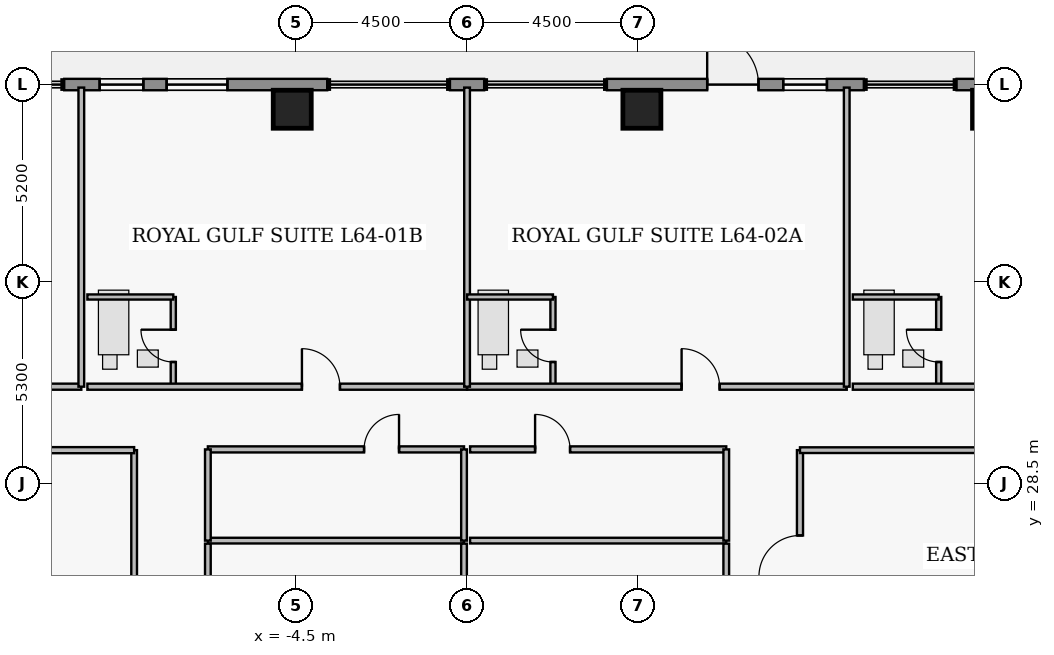
"""IFC4 building model, lengths in metres.
Left out: names, types, materials, properties, quantities, classifications, styles, units other than length and angle.
Written with IfcOpenShell. Run it as: python <this file> out.ifc"""

import sys

from ifc_helpers import new_model, si_unit, direction, frame, frame_2d, origin, origin_2d, place, context, subcontext, project, spatial, rectangle, extrude, element, fill, save


model = new_model("IFC4")
c1 = context("Model", 3, precision=1e-05, world=origin(), true_north=direction((0.0, 1.0)))
c2 = subcontext(c1, "Body", "Model", "MODEL_VIEW")
j1 = project(units=[si_unit("LENGTHUNIT", "METRE"), si_unit("PLANEANGLEUNIT", "RADIAN")], contexts=[c1])
p1 = place(None, origin())
s1 = spatial("IfcSite", under=j1, at=p1, CompositionType="ELEMENT")
p2 = place(p1, origin())
s2 = spatial("IfcBuilding", under=s1, at=p2, CompositionType="ELEMENT")
p3 = place(p2, frame((0.0, 0.0, 254.45)))
s3 = spatial("IfcBuildingStorey", under=s2, at=p3, CompositionType="ELEMENT", Elevation=254.45)
for number, where, z_axis, x_axis in (
    (1, (-4.6, 38.35, 0.0), (0.0, 0.0, 1.0), (1.0, 0.0, 0.0)),
    (2, (4.6, 38.35, 0.0), (0.0, 0.0, 1.0), (1.0, 0.0, 0.0)),
    (3, (13.8, 38.35, 0.0), (0.0, 0.0, 1.0), (1.0, 0.0, 0.0)),
):
    element("IfcColumn", number, at=place(p3, frame(where, z_axis=z_axis, x_axis=x_axis)), inside=s3, PredefinedType="COLUMN", context=c2, shape_type="SweptSolid", body=[
        extrude(rectangle(XDim=1.0, YDim=1.0, at=origin_2d()), origin(), (0.0, 0.0, 1.0), 3.7),
    ])
p4 = place(p3, frame((-10.6, 39.0, 0.0), z_axis=(0.0, 0.0, 1.0), x_axis=(1.0, 0.0, 0.0)))
e4 = element("IfcWall", 4, at=p4, inside=s3, PredefinedType="STANDARD", context=c2, shape_type="SweptSolid", body=[
    extrude(rectangle(XDim=6.92, YDim=0.3, at=frame_2d((3.46, 0.0))), origin(), (0.0, 0.0, 1.0), 3.48),
])
p5 = place(p4, frame((2.695, 0.0, 0.85)))
e5 = element("IfcOpeningElement", 5, at=p5, cuts=e4, PredefinedType="OPENING", context=c2, shape_type="SweptSolid", body=[
    extrude(rectangle(XDim=1.6, YDim=1.8, at=frame_2d((0.8, 0.9))), frame((0.0, 0.16, 0.0), z_axis=(0.0, -1.0, 0.0), x_axis=(1.0, 0.0, 0.0)), (0.0, 0.0, 1.0), 0.32),
])
p6 = place(p4, frame((0.933, 0.0, 0.95)))
e6 = element("IfcOpeningElement", 6, at=p6, cuts=e4, PredefinedType="OPENING", context=c2, shape_type="SweptSolid", body=[
    extrude(rectangle(XDim=1.15, YDim=1.55, at=frame_2d((0.575, 0.775))), frame((0.0, 0.16, 0.0), z_axis=(0.0, -1.0, 0.0), x_axis=(1.0, 0.0, 0.0)), (0.0, 0.0, 1.0), 0.32),
])
p7 = place(p3, frame((-0.45, 39.0, 0.0), z_axis=(0.0, 0.0, 1.0), x_axis=(1.0, 0.0, 0.0)))
e7 = element("IfcWall", 7, at=p7, inside=s3, PredefinedType="STANDARD", context=c2, shape_type="SweptSolid", body=[
    extrude(rectangle(XDim=0.9, YDim=0.3, at=frame_2d((0.45, 0.0))), origin(), (0.0, 0.0, 1.0), 3.48),
])
p8 = place(p3, frame((3.68, 39.0, 0.0), z_axis=(0.0, 0.0, 1.0), x_axis=(1.0, 0.0, 0.0)))
e8 = element("IfcWall", 8, at=p8, inside=s3, PredefinedType="STANDARD", context=c2, shape_type="SweptSolid", body=[
    extrude(rectangle(XDim=6.76, YDim=0.3, at=frame_2d((3.38, 0.0))), origin(), (0.0, 0.0, 1.0), 3.48),
])
p9 = place(p8, frame((2.638, 0.0, 0.0)))
e9 = element("IfcOpeningElement", 9, at=p9, cuts=e8, PredefinedType="OPENING", context=c2, shape_type="SweptSolid", body=[
    extrude(rectangle(XDim=1.35, YDim=2.3, at=frame_2d((0.675, 1.15))), frame((0.0, 0.16, 0.0), z_axis=(0.0, -1.0, 0.0), x_axis=(1.0, 0.0, 0.0)), (0.0, 0.0, 1.0), 0.32),
])
p10 = place(p8, frame((4.639, 0.0, 0.95)))
e10 = element("IfcOpeningElement", 10, at=p10, cuts=e8, PredefinedType="OPENING", context=c2, shape_type="SweptSolid", body=[
    extrude(rectangle(XDim=1.15, YDim=1.55, at=frame_2d((0.575, 0.775))), frame((0.0, 0.16, 0.0), z_axis=(0.0, -1.0, 0.0), x_axis=(1.0, 0.0, 0.0)), (0.0, 0.0, 1.0), 0.32),
])
p11 = place(p3, frame((12.88, 39.0, 0.0), z_axis=(0.0, 0.0, 1.0), x_axis=(1.0, 0.0, 0.0)))
e11 = element("IfcWall", 11, at=p11, inside=s3, PredefinedType="STANDARD", context=c2, shape_type="SweptSolid", body=[
    extrude(rectangle(XDim=3.92, YDim=0.3, at=frame_2d((1.96, 0.0))), origin(), (0.0, 0.0, 1.0), 3.48),
])
p12 = place(p11, frame((2.075, 0.0, 0.95)))
e12 = element("IfcOpeningElement", 12, at=p12, cuts=e11, PredefinedType="OPENING", context=c2, shape_type="SweptSolid", body=[
    extrude(rectangle(XDim=1.15, YDim=1.55, at=frame_2d((0.575, 0.775))), frame((0.0, 0.16, 0.0), z_axis=(0.0, -1.0, 0.0), x_axis=(1.0, 0.0, 0.0)), (0.0, 0.0, 1.0), 0.32),
])
p13 = place(p3, frame((-20.14, 31.05, 0.0), z_axis=(0.0, 0.0, 1.0), x_axis=(1.0, 0.0, 0.0)))
e13 = element("IfcWall", 13, at=p13, inside=s3, PredefinedType="PARTITIONING", context=c2, shape_type="SweptSolid", body=[
    extrude(rectangle(XDim=9.99, YDim=0.16, at=frame_2d((4.995, 0.0))), origin(), (0.0, 0.0, 1.0), 3.48),
])
p14 = place(p13, frame((5.645, 0.0, 0.0)))
e14 = element("IfcOpeningElement", 14, at=p14, cuts=e13, PredefinedType="OPENING", context=c2, shape_type="SweptSolid", body=[
    extrude(rectangle(XDim=1.0, YDim=2.15, at=frame_2d((0.5, 1.075))), frame((0.0, 0.09, 0.0), z_axis=(0.0, -1.0, 0.0), x_axis=(1.0, 0.0, 0.0)), (0.0, 0.0, 1.0), 0.18),
])
p15 = place(p3, frame((-7.73, 31.05, 0.0), z_axis=(0.0, 0.0, 1.0), x_axis=(0.0, 1.0, 0.0)))
e15 = element("IfcWall", 15, at=p15, inside=s3, PredefinedType="PLUMBINGWALL", context=c2, shape_type="SweptSolid", body=[
    extrude(rectangle(XDim=2.36, YDim=0.135, at=frame_2d((1.18, 0.0))), origin(), (0.0, 0.0, 1.0), 3.48),
])
p16 = place(p15, frame((0.65, 0.0, 0.0)))
e16 = element("IfcOpeningElement", 16, at=p16, cuts=e15, PredefinedType="OPENING", context=c2, shape_type="SweptSolid", body=[
    extrude(rectangle(XDim=0.85, YDim=2.1, at=frame_2d((0.425, 1.05))), frame((0.0, 0.077, 0.0), z_axis=(0.0, -1.0, 0.0), x_axis=(1.0, 0.0, 0.0)), (0.0, 0.0, 1.0), 0.155),
])
p17 = place(p3, frame((-9.99, 31.05, 0.0), z_axis=(0.0, 0.0, 1.0), x_axis=(1.0, 0.0, 0.0)))
e17 = element("IfcWall", 17, at=p17, inside=s3, PredefinedType="PARTITIONING", context=c2, shape_type="SweptSolid", body=[
    extrude(rectangle(XDim=9.99, YDim=0.16, at=frame_2d((4.995, 0.0))), origin(), (0.0, 0.0, 1.0), 3.48),
])
p18 = place(p17, frame((5.645, 0.0, 0.0)))
e18 = element("IfcOpeningElement", 18, at=p18, cuts=e17, PredefinedType="OPENING", context=c2, shape_type="SweptSolid", body=[
    extrude(rectangle(XDim=1.0, YDim=2.15, at=frame_2d((0.5, 1.075))), frame((0.0, 0.09, 0.0), z_axis=(0.0, -1.0, 0.0), x_axis=(1.0, 0.0, 0.0)), (0.0, 0.0, 1.0), 0.18),
])
p19 = place(p3, frame((2.26, 31.05, 0.0), z_axis=(0.0, 0.0, 1.0), x_axis=(0.0, 1.0, 0.0)))
e19 = element("IfcWall", 19, at=p19, inside=s3, PredefinedType="PLUMBINGWALL", context=c2, shape_type="SweptSolid", body=[
    extrude(rectangle(XDim=2.36, YDim=0.135, at=frame_2d((1.18, 0.0))), origin(), (0.0, 0.0, 1.0), 3.48),
])
p20 = place(p19, frame((0.65, 0.0, 0.0)))
e20 = element("IfcOpeningElement", 20, at=p20, cuts=e19, PredefinedType="OPENING", context=c2, shape_type="SweptSolid", body=[
    extrude(rectangle(XDim=0.85, YDim=2.1, at=frame_2d((0.425, 1.05))), frame((0.0, 0.077, 0.0), z_axis=(0.0, -1.0, 0.0), x_axis=(1.0, 0.0, 0.0)), (0.0, 0.0, 1.0), 0.155),
])
p21 = place(p3, frame((0.0, 31.05, 0.0), z_axis=(0.0, 0.0, 1.0), x_axis=(1.0, 0.0, 0.0)))
e21 = element("IfcWall", 21, at=p21, inside=s3, PredefinedType="PARTITIONING", context=c2, shape_type="SweptSolid", body=[
    extrude(rectangle(XDim=9.99, YDim=0.16, at=frame_2d((4.995, 0.0))), origin(), (0.0, 0.0, 1.0), 3.48),
])
p22 = place(p21, frame((5.645, 0.0, 0.0)))
e22 = element("IfcOpeningElement", 22, at=p22, cuts=e21, PredefinedType="OPENING", context=c2, shape_type="SweptSolid", body=[
    extrude(rectangle(XDim=1.0, YDim=2.15, at=frame_2d((0.5, 1.075))), frame((0.0, 0.09, 0.0), z_axis=(0.0, -1.0, 0.0), x_axis=(1.0, 0.0, 0.0)), (0.0, 0.0, 1.0), 0.18),
])
p23 = place(p3, frame((12.41, 31.05, 0.0), z_axis=(0.0, 0.0, 1.0), x_axis=(0.0, 1.0, 0.0)))
e23 = element("IfcWall", 23, at=p23, inside=s3, PredefinedType="PLUMBINGWALL", context=c2, shape_type="SweptSolid", body=[
    extrude(rectangle(XDim=2.36, YDim=0.135, at=frame_2d((1.18, 0.0))), origin(), (0.0, 0.0, 1.0), 3.48),
])
p24 = place(p23, frame((0.65, 0.0, 0.0)))
e24 = element("IfcOpeningElement", 24, at=p24, cuts=e23, PredefinedType="OPENING", context=c2, shape_type="SweptSolid", body=[
    extrude(rectangle(XDim=0.85, YDim=2.1, at=frame_2d((0.425, 1.05))), frame((0.0, 0.077, 0.0), z_axis=(0.0, -1.0, 0.0), x_axis=(1.0, 0.0, 0.0)), (0.0, 0.0, 1.0), 0.155),
])
p25 = place(p3, frame((10.15, 31.05, 0.0), z_axis=(0.0, 0.0, 1.0), x_axis=(1.0, 0.0, 0.0)))
e25 = element("IfcWall", 25, at=p25, inside=s3, PredefinedType="PARTITIONING", context=c2, shape_type="SweptSolid", body=[
    extrude(rectangle(XDim=9.99, YDim=0.16, at=frame_2d((4.995, 0.0))), origin(), (0.0, 0.0, 1.0), 3.48),
])
p26 = place(p25, frame((5.645, 0.0, 0.0)))
e26 = element("IfcOpeningElement", 26, at=p26, cuts=e25, PredefinedType="OPENING", context=c2, shape_type="SweptSolid", body=[
    extrude(rectangle(XDim=1.0, YDim=2.15, at=frame_2d((0.5, 1.075))), frame((0.0, 0.09, 0.0), z_axis=(0.0, -1.0, 0.0), x_axis=(1.0, 0.0, 0.0)), (0.0, 0.0, 1.0), 0.18),
])
p27 = place(p3, frame((-6.82, 29.4, 0.0), z_axis=(0.0, 0.0, 1.0), x_axis=(1.0, 0.0, 0.0)))
e27 = element("IfcWall", 27, at=p27, inside=s3, PredefinedType="PARTITIONING", context=c2, shape_type="SweptSolid", body=[
    extrude(rectangle(XDim=6.74, YDim=0.16, at=frame_2d((3.37, 0.0))), origin(), (0.0, 0.0, 1.0), 3.48),
])
p28 = place(p27, frame((4.11, 0.0, 0.0)))
e28 = element("IfcOpeningElement", 28, at=p28, cuts=e27, PredefinedType="OPENING", context=c2, shape_type="SweptSolid", body=[
    extrude(rectangle(XDim=0.92, YDim=2.12, at=frame_2d((0.46, 1.06))), frame((0.0, 0.09, 0.0), z_axis=(0.0, -1.0, 0.0), x_axis=(1.0, 0.0, 0.0)), (0.0, 0.0, 1.0), 0.18),
])
p29 = place(p3, frame((0.08, 29.4, 0.0), z_axis=(0.0, 0.0, 1.0), x_axis=(1.0, 0.0, 0.0)))
e29 = element("IfcWall", 29, at=p29, inside=s3, PredefinedType="PARTITIONING", context=c2, shape_type="SweptSolid", body=[
    extrude(rectangle(XDim=6.74, YDim=0.16, at=frame_2d((3.37, 0.0))), origin(), (0.0, 0.0, 1.0), 3.48),
])
p30 = place(p29, frame((1.71, 0.0, 0.0)))
e30 = element("IfcOpeningElement", 30, at=p30, cuts=e29, PredefinedType="OPENING", context=c2, shape_type="SweptSolid", body=[
    extrude(rectangle(XDim=0.92, YDim=2.12, at=frame_2d((0.46, 1.06))), frame((0.0, 0.09, 0.0), z_axis=(0.0, -1.0, 0.0), x_axis=(1.0, 0.0, 0.0)), (0.0, 0.0, 1.0), 0.18),
])
p31 = place(p3, frame((8.76, 23.81, 0.0), z_axis=(0.0, 0.0, 1.0), x_axis=(0.0, 1.0, 0.0)))
e31 = element("IfcWall", 31, at=p31, inside=s3, PredefinedType="PARTITIONING", context=c2, shape_type="SweptSolid", body=[
    extrude(rectangle(XDim=5.57, YDim=0.16, at=frame_2d((2.785, 0.0))), origin(), (0.0, 0.0, 1.0), 3.48),
])
p32 = place(p31, frame((2.245, 0.0, 0.0)))
e32 = element("IfcOpeningElement", 32, at=p32, cuts=e31, PredefinedType="OPENING", context=c2, shape_type="SweptSolid", body=[
    extrude(rectangle(XDim=1.08, YDim=2.18, at=frame_2d((0.54, 1.09))), frame((0.0, 0.09, 0.0), z_axis=(0.0, -1.0, 0.0), x_axis=(1.0, 0.0, 0.0)), (0.0, 0.0, 1.0), 0.18),
])
p33 = place(p3, frame((-10.15, 31.05, 0.0), z_axis=(0.0, 0.0, 1.0), x_axis=(0.0, 1.0, 0.0)))
e33 = element("IfcWall", 33, at=p33, inside=s3, PredefinedType="PARTITIONING", context=c2, shape_type="SweptSolid", body=[
    extrude(rectangle(XDim=7.87, YDim=0.15, at=frame_2d((3.935, 0.0))), origin(), (0.0, 0.0, 1.0), 3.48),
])
p34 = place(p3, frame((-9.99, 33.41, 0.0), z_axis=(0.0, 0.0, 1.0), x_axis=(1.0, 0.0, 0.0)))
e34 = element("IfcWall", 34, at=p34, inside=s3, PredefinedType="PLUMBINGWALL", context=c2, shape_type="SweptSolid", body=[
    extrude(rectangle(XDim=2.26, YDim=0.135, at=frame_2d((1.13, 0.0))), origin(), (0.0, 0.0, 1.0), 3.076),
])
p35 = place(p3, frame((0.0, 31.05, 0.0), z_axis=(0.0, 0.0, 1.0), x_axis=(0.0, 1.0, 0.0)))
e35 = element("IfcWall", 35, at=p35, inside=s3, PredefinedType="PARTITIONING", context=c2, shape_type="SweptSolid", body=[
    extrude(rectangle(XDim=7.87, YDim=0.15, at=frame_2d((3.935, 0.0))), origin(), (0.0, 0.0, 1.0), 3.48),
])
p36 = place(p3, frame((0.0, 33.41, 0.0), z_axis=(0.0, 0.0, 1.0), x_axis=(1.0, 0.0, 0.0)))
e36 = element("IfcWall", 36, at=p36, inside=s3, PredefinedType="PLUMBINGWALL", context=c2, shape_type="SweptSolid", body=[
    extrude(rectangle(XDim=2.26, YDim=0.135, at=frame_2d((1.13, 0.0))), origin(), (0.0, 0.0, 1.0), 3.076),
])
p37 = place(p3, frame((9.99, 31.05, 0.0), z_axis=(0.0, 0.0, 1.0), x_axis=(0.0, 1.0, 0.0)))
e37 = element("IfcWall", 37, at=p37, inside=s3, PredefinedType="PARTITIONING", context=c2, shape_type="SweptSolid", body=[
    extrude(rectangle(XDim=7.87, YDim=0.15, at=frame_2d((3.935, 0.0))), origin(), (0.0, 0.0, 1.0), 3.48),
])
p38 = place(p3, frame((10.15, 33.41, 0.0), z_axis=(0.0, 0.0, 1.0), x_axis=(1.0, 0.0, 0.0)))
e38 = element("IfcWall", 38, at=p38, inside=s3, PredefinedType="PLUMBINGWALL", context=c2, shape_type="SweptSolid", body=[
    extrude(rectangle(XDim=2.26, YDim=0.135, at=frame_2d((1.13, 0.0))), origin(), (0.0, 0.0, 1.0), 3.076),
])
p39 = place(p3, frame((-6.82, 27.0, 0.0), z_axis=(0.0, 0.0, 1.0), x_axis=(1.0, 0.0, 0.0)))
e39 = element("IfcWall", 39, at=p39, inside=s3, PredefinedType="PARTITIONING", context=c2, shape_type="SweptSolid", body=[
    extrude(rectangle(XDim=6.74, YDim=0.15, at=frame_2d((3.37, 0.0))), origin(), (0.0, 0.0, 1.0), 3.48),
])
for number, where, z_axis, x_axis in (
    (40, (-6.82, 27.0, 0.0), (0.0, 0.0, 1.0), (0.0, 1.0, 0.0)),
    (41, (-0.08, 27.0, 0.0), (0.0, 0.0, 1.0), (0.0, 1.0, 0.0)),
):
    element("IfcWall", number, at=place(p3, frame(where, z_axis=z_axis, x_axis=x_axis)), inside=s3, PredefinedType="PARTITIONING", context=c2, shape_type="SweptSolid", body=[
        extrude(rectangle(XDim=2.4, YDim=0.15, at=frame_2d((1.2, 0.0))), origin(), (0.0, 0.0, 1.0), 3.48),
    ])
p40 = place(p3, frame((0.08, 27.0, 0.0), z_axis=(0.0, 0.0, 1.0), x_axis=(1.0, 0.0, 0.0)))
e42 = element("IfcWall", 42, at=p40, inside=s3, PredefinedType="PARTITIONING", context=c2, shape_type="SweptSolid", body=[
    extrude(rectangle(XDim=6.74, YDim=0.15, at=frame_2d((3.37, 0.0))), origin(), (0.0, 0.0, 1.0), 3.48),
])
p41 = place(p3, frame((6.82, 27.0, 0.0), z_axis=(0.0, 0.0, 1.0), x_axis=(0.0, 1.0, 0.0)))
e43 = element("IfcWall", 43, at=p41, inside=s3, PredefinedType="PARTITIONING", context=c2, shape_type="SweptSolid", body=[
    extrude(rectangle(XDim=2.4, YDim=0.15, at=frame_2d((1.2, 0.0))), origin(), (0.0, 0.0, 1.0), 3.48),
])
for number, where, z_axis, x_axis in (
    (44, (-6.82, 16.7, 0.0), (0.0, 0.0, 1.0), (0.0, 1.0, 0.0)),
    (45, (-0.08, 16.7, 0.0), (0.0, 0.0, 1.0), (0.0, 1.0, 0.0)),
    (46, (6.82, 16.7, 0.0), (0.0, 0.0, 1.0), (0.0, 1.0, 0.0)),
):
    element("IfcWall", number, at=place(p3, frame(where, z_axis=z_axis, x_axis=x_axis)), inside=s3, PredefinedType="PARTITIONING", context=c2, shape_type="SweptSolid", body=[
        extrude(rectangle(XDim=10.22, YDim=0.15, at=frame_2d((5.11, 0.0))), origin(), (0.0, 0.0, 1.0), 3.48),
    ])
p42 = place(p3, frame((-8.76, 16.7, 0.0), z_axis=(0.0, 0.0, 1.0), x_axis=(0.0, 1.0, 0.0)))
e47 = element("IfcWall", 47, at=p42, inside=s3, PredefinedType="PARTITIONING", context=c2, shape_type="SweptSolid", body=[
    extrude(rectangle(XDim=12.68, YDim=0.15, at=frame_2d((6.34, 0.0))), origin(), (0.0, 0.0, 1.0), 3.48),
])
p43 = place(p3, frame((-22.64, 29.38, 0.0), z_axis=(0.0, 0.0, 1.0), x_axis=(1.0, 0.0, 0.0)))
e48 = element("IfcWall", 48, at=p43, inside=s3, PredefinedType="PARTITIONING", context=c2, shape_type="SweptSolid", body=[
    extrude(rectangle(XDim=13.88, YDim=0.16, at=frame_2d((6.94, 0.0))), origin(), (0.0, 0.0, 1.0), 3.48),
])
p44 = place(p3, frame((8.76, 29.38, 0.0), z_axis=(0.0, 0.0, 1.0), x_axis=(1.0, 0.0, 0.0)))
e49 = element("IfcWall", 49, at=p44, inside=s3, PredefinedType="PARTITIONING", context=c2, shape_type="SweptSolid", body=[
    extrude(rectangle(XDim=11.38, YDim=0.15, at=frame_2d((5.69, 0.0))), origin(), (0.0, 0.0, 1.0), 3.48),
])
p45 = place(p5, origin())
e50 = element("IfcWindow", 50, at=p45, inside=s3, PartitioningType="SINGLE_PANEL", PredefinedType="WINDOW", context=c2, shape_type="SweptSolid", body=[
    extrude(rectangle(XDim=1.6, YDim=1.8, at=frame_2d((0.8, 0.9))), frame((0.0, 0.03, 0.0), z_axis=(0.0, -1.0, 0.0), x_axis=(1.0, 0.0, 0.0)), (0.0, 0.0, 1.0), 0.06),
])
fill(e5, e50)
p46 = place(p6, origin())
e51 = element("IfcWindow", 51, at=p46, inside=s3, PartitioningType="SINGLE_PANEL", PredefinedType="WINDOW", context=c2, shape_type="SweptSolid", body=[
    extrude(rectangle(XDim=1.15, YDim=1.55, at=frame_2d((0.575, 0.775))), frame((0.0, 0.03, 0.0), z_axis=(0.0, -1.0, 0.0), x_axis=(1.0, 0.0, 0.0)), (0.0, 0.0, 1.0), 0.06),
])
fill(e6, e51)
p47 = place(p9, origin())
e52 = element("IfcDoor", 52, at=p47, inside=s3, OperationType="SINGLE_SWING_LEFT", PredefinedType="DOOR", context=c2, shape_type="SweptSolid", body=[
    extrude(rectangle(XDim=1.35, YDim=2.3, at=frame_2d((0.675, 1.15))), frame((0.0, 0.025, 0.0), z_axis=(0.0, -1.0, 0.0), x_axis=(1.0, 0.0, 0.0)), (0.0, 0.0, 1.0), 0.05),
])
fill(e9, e52)
p48 = place(p10, origin())
e53 = element("IfcWindow", 53, at=p48, inside=s3, PartitioningType="SINGLE_PANEL", PredefinedType="WINDOW", context=c2, shape_type="SweptSolid", body=[
    extrude(rectangle(XDim=1.15, YDim=1.55, at=frame_2d((0.575, 0.775))), frame((0.0, 0.03, 0.0), z_axis=(0.0, -1.0, 0.0), x_axis=(1.0, 0.0, 0.0)), (0.0, 0.0, 1.0), 0.06),
])
fill(e10, e53)
p49 = place(p16, origin())
e54 = element("IfcDoor", 54, at=p49, inside=s3, OperationType="SINGLE_SWING_RIGHT", PredefinedType="DOOR", context=c2, shape_type="SweptSolid", body=[
    extrude(rectangle(XDim=0.85, YDim=2.1, at=frame_2d((0.425, 1.05))), frame((0.0, 0.025, 0.0), z_axis=(0.0, -1.0, 0.0), x_axis=(1.0, 0.0, 0.0)), (0.0, 0.0, 1.0), 0.05),
])
fill(e16, e54)
p50 = place(p18, origin())
e55 = element("IfcDoor", 55, at=p50, inside=s3, OperationType="SINGLE_SWING_LEFT", PredefinedType="DOOR", context=c2, shape_type="SweptSolid", body=[
    extrude(rectangle(XDim=1.0, YDim=2.15, at=frame_2d((0.5, 1.075))), frame((0.0, 0.025, 0.0), z_axis=(0.0, -1.0, 0.0), x_axis=(1.0, 0.0, 0.0)), (0.0, 0.0, 1.0), 0.05),
])
fill(e18, e55)
p51 = place(p20, origin())
e56 = element("IfcDoor", 56, at=p51, inside=s3, OperationType="SINGLE_SWING_RIGHT", PredefinedType="DOOR", context=c2, shape_type="SweptSolid", body=[
    extrude(rectangle(XDim=0.85, YDim=2.1, at=frame_2d((0.425, 1.05))), frame((0.0, 0.025, 0.0), z_axis=(0.0, -1.0, 0.0), x_axis=(1.0, 0.0, 0.0)), (0.0, 0.0, 1.0), 0.05),
])
fill(e20, e56)
p52 = place(p22, origin())
e57 = element("IfcDoor", 57, at=p52, inside=s3, OperationType="SINGLE_SWING_LEFT", PredefinedType="DOOR", context=c2, shape_type="SweptSolid", body=[
    extrude(rectangle(XDim=1.0, YDim=2.15, at=frame_2d((0.5, 1.075))), frame((0.0, 0.025, 0.0), z_axis=(0.0, -1.0, 0.0), x_axis=(1.0, 0.0, 0.0)), (0.0, 0.0, 1.0), 0.05),
])
fill(e22, e57)
p53 = place(p24, origin())
e58 = element("IfcDoor", 58, at=p53, inside=s3, OperationType="SINGLE_SWING_RIGHT", PredefinedType="DOOR", context=c2, shape_type="SweptSolid", body=[
    extrude(rectangle(XDim=0.85, YDim=2.1, at=frame_2d((0.425, 1.05))), frame((0.0, 0.025, 0.0), z_axis=(0.0, -1.0, 0.0), x_axis=(1.0, 0.0, 0.0)), (0.0, 0.0, 1.0), 0.05),
])
fill(e24, e58)
p54 = place(p28, origin())
e59 = element("IfcDoor", 59, at=p54, inside=s3, OperationType="SINGLE_SWING_RIGHT", PredefinedType="DOOR", context=c2, shape_type="SweptSolid", body=[
    extrude(rectangle(XDim=0.92, YDim=2.12, at=frame_2d((0.46, 1.06))), frame((0.0, 0.025, 0.0), z_axis=(0.0, -1.0, 0.0), x_axis=(1.0, 0.0, 0.0)), (0.0, 0.0, 1.0), 0.05),
])
fill(e28, e59)
p55 = place(p30, origin())
e60 = element("IfcDoor", 60, at=p55, inside=s3, OperationType="SINGLE_SWING_LEFT", PredefinedType="DOOR", context=c2, shape_type="SweptSolid", body=[
    extrude(rectangle(XDim=0.92, YDim=2.12, at=frame_2d((0.46, 1.06))), frame((0.0, 0.025, 0.0), z_axis=(0.0, -1.0, 0.0), x_axis=(1.0, 0.0, 0.0)), (0.0, 0.0, 1.0), 0.05),
])
fill(e30, e60)
p56 = place(p32, origin())
e61 = element("IfcDoor", 61, at=p56, inside=s3, OperationType="SINGLE_SWING_LEFT", PredefinedType="DOOR", context=c2, shape_type="SweptSolid", body=[
    extrude(rectangle(XDim=1.08, YDim=2.18, at=frame_2d((0.54, 1.09))), frame((0.0, 0.025, 0.0), z_axis=(0.0, -1.0, 0.0), x_axis=(1.0, 0.0, 0.0)), (0.0, 0.0, 1.0), 0.05),
])
fill(e32, e61)
save(model, sys.argv[1])
